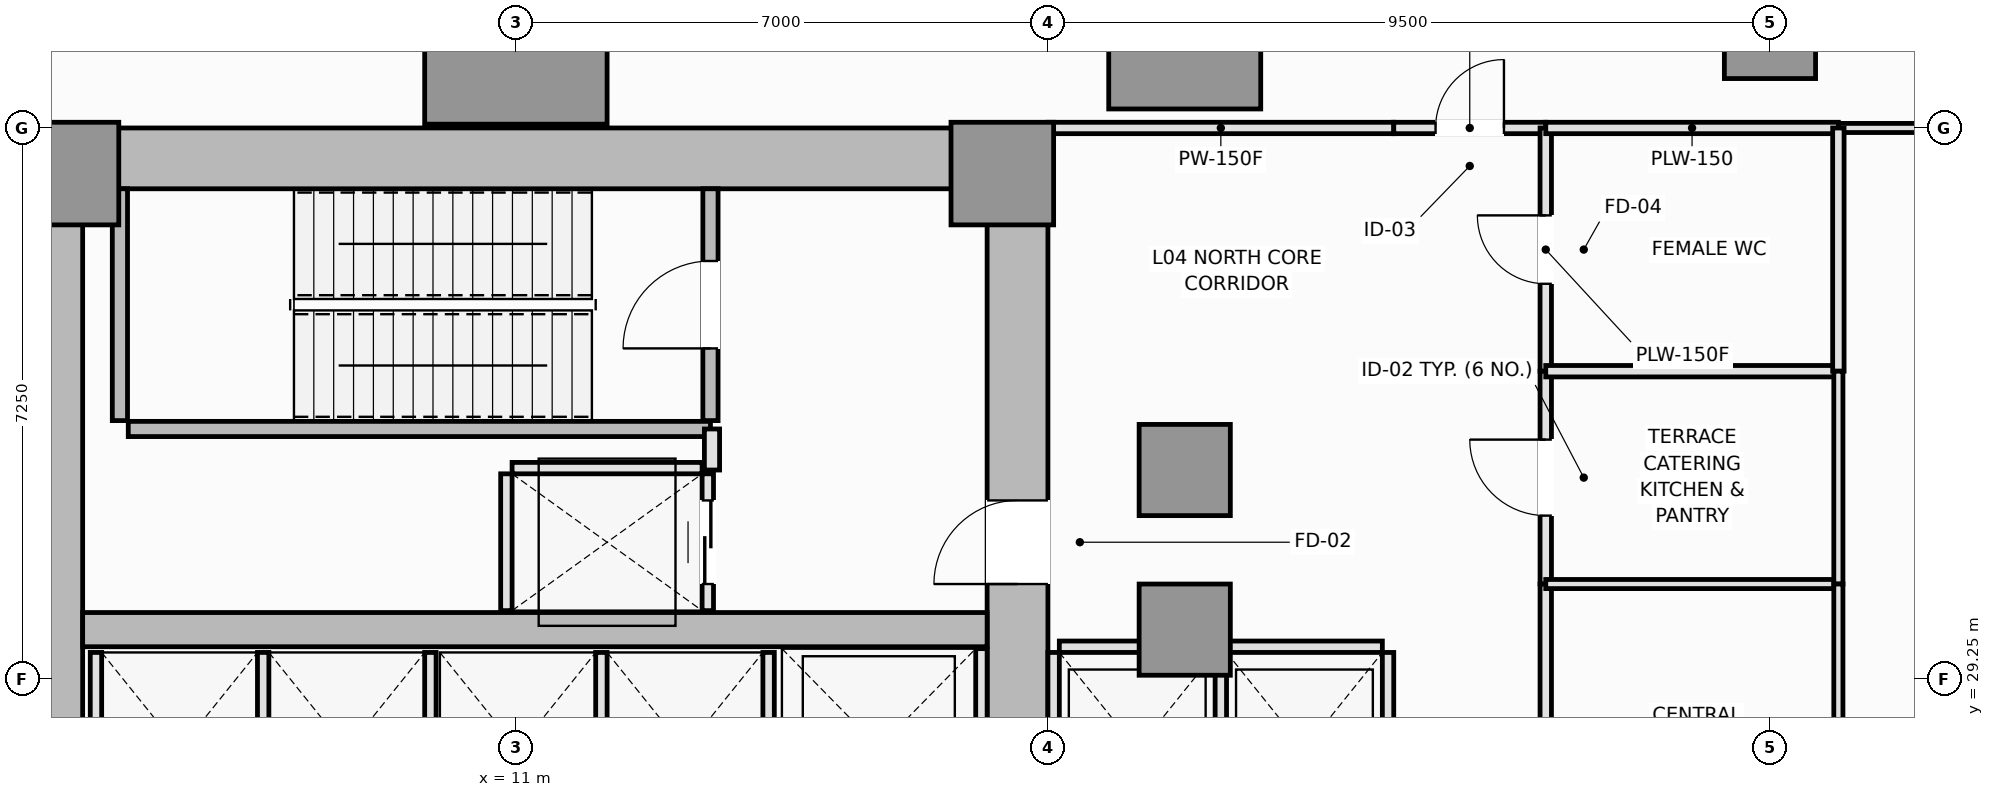
"""IFC4 building model, lengths in metres.
Left out: names, types, materials, properties, quantities, classifications, styles, units other than length and angle.
Written with IfcOpenShell. Run it as: python <this file> out.ifc"""

import sys

from ifc_helpers import new_model, si_unit, direction, frame, frame_2d, origin, origin_2d, place, context, subcontext, project, spatial, rectangle, extrude, element, fill, save


model = new_model("IFC4")
c1 = context("Model", 3, precision=1e-05, world=origin(), true_north=direction((0.0, 1.0)))
c2 = subcontext(c1, "Body", "Model", "MODEL_VIEW")
j1 = project(units=[si_unit("LENGTHUNIT", "METRE"), si_unit("PLANEANGLEUNIT", "RADIAN")], contexts=[c1])
p1 = place(None, origin())
s1 = spatial("IfcSite", under=j1, at=p1, CompositionType="ELEMENT")
p2 = place(p1, origin())
s2 = spatial("IfcBuilding", under=s1, at=p2, CompositionType="ELEMENT")
p3 = place(p2, frame((0.0, 0.0, 20.4)))
s3 = spatial("IfcBuildingStorey", under=s2, at=p3, CompositionType="ELEMENT", Elevation=20.4)
p4 = place(p3, frame((4.5, 36.1, 0.0), z_axis=(0.0, 0.0, 1.0), x_axis=(1.0, 0.0, 0.0)))
e1 = element("IfcWall", 1, at=p4, inside=s3, PredefinedType="SHEAR", context=c2, shape_type="SweptSolid", body=[
    extrude(rectangle(XDim=13.5, YDim=0.8, at=frame_2d((6.75, 0.0))), origin(), (0.0, 0.0, 1.0), 5.2),
])
p5 = place(p3, frame((4.9, 14.8, 0.0), z_axis=(0.0, 0.0, 1.0), x_axis=(0.0, 1.0, 0.0)))
e2 = element("IfcWall", 2, at=p5, inside=s3, PredefinedType="SHEAR", context=c2, shape_type="SweptSolid", body=[
    extrude(rectangle(XDim=20.9, YDim=0.8, at=frame_2d((10.45, 0.0))), origin(), (0.0, 0.0, 1.0), 5.2),
])
p6 = place(p3, frame((17.6, 27.05, 0.0), z_axis=(0.0, 0.0, 1.0), x_axis=(0.0, 1.0, 0.0)))
e3 = element("IfcWall", 3, at=p6, inside=s3, PredefinedType="SHEAR", context=c2, shape_type="SweptSolid", body=[
    extrude(rectangle(XDim=8.65, YDim=0.8, at=frame_2d((4.325, 0.0))), origin(), (0.0, 0.0, 1.0), 5.2),
])
p7 = place(p6, frame((3.45, 0.0, 0.0)))
e4 = element("IfcOpeningElement", 4, at=p7, cuts=e3, PredefinedType="OPENING", context=c2, shape_type="SweptSolid", body=[
    extrude(rectangle(XDim=1.1, YDim=2.15, at=frame_2d((0.55, 1.075))), frame((0.0, 0.41, 0.0), z_axis=(0.0, -1.0, 0.0), x_axis=(1.0, 0.0, 0.0)), (0.0, 0.0, 1.0), 0.82),
])
p8 = place(p3, frame((5.3, 29.9, 0.0), z_axis=(0.0, 0.0, 1.0), x_axis=(1.0, 0.0, 0.0)))
e5 = element("IfcWall", 5, at=p8, inside=s3, PredefinedType="SHEAR", context=c2, shape_type="SweptSolid", body=[
    extrude(rectangle(XDim=11.9, YDim=0.45, at=frame_2d((5.95, 0.0))), origin(), (0.0, 0.0, 1.0), 5.2),
])
for number, where, z_axis, x_axis in (
    (6, (5.1, 35.9, 0.0), (0.0, 0.0, 1.0), (1.0, 0.0, 0.0)),
    (7, (17.4, 35.9, 0.0), (0.0, 0.0, 1.0), (1.0, 0.0, 0.0)),
):
    element("IfcColumn", number, at=place(p3, frame(where, z_axis=z_axis, x_axis=x_axis)), inside=s3, PredefinedType="PILASTER", context=c2, shape_type="SweptSolid", body=[
        extrude(rectangle(XDim=1.35, YDim=1.35, at=origin_2d()), origin(), (0.0, 0.0, 1.0), 5.2),
    ])
p9 = place(p3, frame((11.0, 37.75, 0.0), z_axis=(0.0, 0.0, 1.0), x_axis=(1.0, 0.0, 0.0)))
e8 = element("IfcColumn", 8, at=p9, inside=s3, PredefinedType="COLUMN", context=c2, shape_type="SweptSolid", body=[
    extrude(rectangle(XDim=2.4, YDim=2.4, at=origin_2d()), origin(), (0.0, 0.0, 1.0), 5.2),
])
p10 = place(p3, frame((27.5, 37.75, 0.0), z_axis=(0.0, 0.0, 1.0), x_axis=(1.0, 0.0, 0.0)))
e9 = element("IfcColumn", 9, at=p10, inside=s3, PredefinedType="COLUMN", context=c2, shape_type="SweptSolid", body=[
    extrude(rectangle(XDim=1.2, YDim=1.2, at=origin_2d()), origin(), (0.0, 0.0, 1.0), 5.2),
])
p11 = place(p3, frame((19.8, 37.75, 0.0), z_axis=(0.0, 0.0, 1.0), x_axis=(1.0, 0.0, 0.0)))
e10 = element("IfcColumn", 10, at=p11, inside=s3, PredefinedType="COLUMN", context=c2, shape_type="SweptSolid", body=[
    extrude(rectangle(XDim=2.0, YDim=2.0, at=origin_2d()), origin(), (0.0, 0.0, 1.0), 5.2),
])
for number, where, z_axis, x_axis in (
    (11, (19.8, 29.9, 0.0), (0.0, 0.0, 1.0), (1.0, 0.0, 0.0)),
    (12, (19.8, 32.0, 0.0), (0.0, 0.0, 1.0), (1.0, 0.0, 0.0)),
):
    element("IfcColumn", number, at=place(p3, frame(where, z_axis=z_axis, x_axis=x_axis)), inside=s3, PredefinedType="COLUMN", context=c2, shape_type="SweptSolid", body=[
        extrude(rectangle(XDim=1.2, YDim=1.2, at=origin_2d()), origin(), (0.0, 0.0, 1.0), 5.2),
    ])
p12 = place(p3, frame((5.79, 32.65, 0.0), z_axis=(0.0, 0.0, 1.0), x_axis=(0.0, 1.0, 0.0)))
e13 = element("IfcWall", 13, at=p12, inside=s3, PredefinedType="SOLIDWALL", context=c2, shape_type="SweptSolid", body=[
    extrude(rectangle(XDim=3.05, YDim=0.2, at=frame_2d((1.525, 0.0))), origin(), (0.0, 0.0, 1.0), 5.2),
])
p13 = place(p3, frame((5.9, 32.54, 0.0), z_axis=(0.0, 0.0, 1.0), x_axis=(1.0, 0.0, 0.0)))
e14 = element("IfcWall", 14, at=p13, inside=s3, PredefinedType="SOLIDWALL", context=c2, shape_type="SweptSolid", body=[
    extrude(rectangle(XDim=7.66, YDim=0.2, at=frame_2d((3.83, 0.0))), origin(), (0.0, 0.0, 1.0), 5.2),
])
p14 = place(p3, frame((13.56, 32.65, 0.0), z_axis=(0.0, 0.0, 1.0), x_axis=(0.0, 1.0, 0.0)))
e15 = element("IfcWall", 15, at=p14, inside=s3, PredefinedType="SOLIDWALL", context=c2, shape_type="SweptSolid", body=[
    extrude(rectangle(XDim=3.05, YDim=0.2, at=frame_2d((1.525, 0.0))), origin(), (0.0, 0.0, 1.0), 5.2),
])
p15 = place(p14, frame((0.95, 0.0, 0.0)))
e16 = element("IfcOpeningElement", 16, at=p15, cuts=e15, PredefinedType="OPENING", context=c2, shape_type="SweptSolid", body=[
    extrude(rectangle(XDim=1.15, YDim=2.15, at=frame_2d((0.575, 1.075))), frame((0.0, 0.11, 0.0), z_axis=(0.0, -1.0, 0.0), x_axis=(1.0, 0.0, 0.0)), (0.0, 0.0, 1.0), 0.22),
])
p16 = place(p3, frame((18.15, 29.675, 0.0), z_axis=(0.0, 0.0, 1.0), x_axis=(1.0, 0.0, 0.0)))
e17 = element("IfcWall", 17, at=p16, inside=s3, PredefinedType="PARTITIONING", context=c2, shape_type="SweptSolid", body=[
    extrude(rectangle(XDim=2.05, YDim=0.15, at=frame_2d((1.025, 0.0))), origin(), (0.0, 0.0, 1.0), 5.02),
])
for number, where, z_axis, x_axis in (
    (18, (18.075, 27.05, 0.0), (0.0, 0.0, 1.0), (0.0, 1.0, 0.0)),
    (19, (20.275, 27.05, 0.0), (0.0, 0.0, 1.0), (0.0, 1.0, 0.0)),
):
    element("IfcWall", number, at=place(p3, frame(where, z_axis=z_axis, x_axis=x_axis)), inside=s3, PredefinedType="PARTITIONING", context=c2, shape_type="SweptSolid", body=[
        extrude(rectangle(XDim=2.55, YDim=0.15, at=frame_2d((1.275, 0.0))), origin(), (0.0, 0.0, 1.0), 5.02),
    ])
p17 = place(p3, frame((20.35, 29.675, 0.0), z_axis=(0.0, 0.0, 1.0), x_axis=(1.0, 0.0, 0.0)))
e20 = element("IfcWall", 20, at=p17, inside=s3, PredefinedType="PARTITIONING", context=c2, shape_type="SweptSolid", body=[
    extrude(rectangle(XDim=2.05, YDim=0.15, at=frame_2d((1.025, 0.0))), origin(), (0.0, 0.0, 1.0), 5.02),
])
p18 = place(p3, frame((22.475, 27.05, 0.0), z_axis=(0.0, 0.0, 1.0), x_axis=(0.0, 1.0, 0.0)))
e21 = element("IfcWall", 21, at=p18, inside=s3, PredefinedType="PARTITIONING", context=c2, shape_type="SweptSolid", body=[
    extrude(rectangle(XDim=2.55, YDim=0.15, at=frame_2d((1.275, 0.0))), origin(), (0.0, 0.0, 1.0), 4.57),
])
for number, where, z_axis, x_axis in (
    (22, (5.475, 27.05, 0.0), (0.0, 0.0, 1.0), (0.0, 1.0, 0.0)),
    (23, (7.675, 27.05, 0.0), (0.0, 0.0, 1.0), (0.0, 1.0, 0.0)),
    (24, (9.875, 27.05, 0.0), (0.0, 0.0, 1.0), (0.0, 1.0, 0.0)),
    (25, (12.125, 27.05, 0.0), (0.0, 0.0, 1.0), (0.0, 1.0, 0.0)),
    (26, (14.325, 27.05, 0.0), (0.0, 0.0, 1.0), (0.0, 1.0, 0.0)),
):
    element("IfcWall", number, at=place(p3, frame(where, z_axis=z_axis, x_axis=x_axis)), inside=s3, PredefinedType="PARTITIONING", context=c2, shape_type="SweptSolid", body=[
        extrude(rectangle(XDim=2.55, YDim=0.15, at=frame_2d((1.275, 0.0))), origin(), (0.0, 0.0, 1.0), 5.02),
    ])
p19 = place(p3, frame((17.125, 27.05, 0.0), z_axis=(0.0, 0.0, 1.0), x_axis=(0.0, 1.0, 0.0)))
e27 = element("IfcWall", 27, at=p19, inside=s3, PredefinedType="PARTITIONING", context=c2, shape_type="SweptSolid", body=[
    extrude(rectangle(XDim=2.6, YDim=0.15, at=frame_2d((1.3, 0.0))), origin(), (0.0, 0.0, 1.0), 5.02),
])
p20 = place(p3, frame((10.95, 32.025, 0.0), z_axis=(0.0, 0.0, 1.0), x_axis=(1.0, 0.0, 0.0)))
e28 = element("IfcWall", 28, at=p20, inside=s3, PredefinedType="PARTITIONING", context=c2, shape_type="SweptSolid", body=[
    extrude(rectangle(XDim=2.5, YDim=0.15, at=frame_2d((1.25, 0.0))), origin(), (0.0, 0.0, 1.0), 5.02),
])
p21 = place(p3, frame((10.875, 30.15, 0.0), z_axis=(0.0, 0.0, 1.0), x_axis=(0.0, 1.0, 0.0)))
e29 = element("IfcWall", 29, at=p21, inside=s3, PredefinedType="PARTITIONING", context=c2, shape_type="SweptSolid", body=[
    extrude(rectangle(XDim=1.8, YDim=0.15, at=frame_2d((0.9, 0.0))), origin(), (0.0, 0.0, 1.0), 5.02),
])
p22 = place(p3, frame((13.525, 30.15, 0.0), z_axis=(0.0, 0.0, 1.0), x_axis=(0.0, 1.0, 0.0)))
e30 = element("IfcWall", 30, at=p22, inside=s3, PredefinedType="PARTITIONING", context=c2, shape_type="SweptSolid", body=[
    extrude(rectangle(XDim=1.8, YDim=0.15, at=frame_2d((0.9, 0.0))), origin(), (0.0, 0.0, 1.0), 5.02),
])
p23 = place(p22, frame((0.35, 0.0, 0.0)))
e31 = element("IfcOpeningElement", 31, at=p23, cuts=e30, PredefinedType="OPENING", context=c2, shape_type="SweptSolid", body=[
    extrude(rectangle(XDim=1.1, YDim=2.2, at=frame_2d((0.55, 1.1))), frame((0.0, 0.085, 0.0), z_axis=(0.0, -1.0, 0.0), x_axis=(1.0, 0.0, 0.0)), (0.0, 0.0, 1.0), 0.17),
])
p24 = place(p3, frame((13.58, 32.0, 0.0), z_axis=(0.0, 0.0, 1.0), x_axis=(0.0, 1.0, 0.0)))
e32 = element("IfcWall", 32, at=p24, inside=s3, PredefinedType="PARTITIONING", context=c2, shape_type="SweptSolid", body=[
    extrude(rectangle(XDim=0.54, YDim=0.2, at=frame_2d((0.27, 0.0))), origin(), (0.0, 0.0, 1.0), 5.02),
])
p25 = place(p3, frame((18.0, 36.5, 0.0), z_axis=(0.0, 0.0, 1.0), x_axis=(1.0, 0.0, 0.0)))
e33 = element("IfcWall", 33, at=p25, inside=s3, PredefinedType="PARTITIONING", context=c2, shape_type="SweptSolid", body=[
    extrude(rectangle(XDim=4.55, YDim=0.15, at=frame_2d((2.275, 0.0))), origin(), (0.0, 0.0, 1.0), 5.02),
])
p26 = place(p3, frame((22.55, 36.5, 0.0), z_axis=(0.0, 0.0, 1.0), x_axis=(1.0, 0.0, 0.0)))
e34 = element("IfcWall", 34, at=p26, inside=s3, PredefinedType="PARTITIONING", context=c2, shape_type="SweptSolid", body=[
    extrude(rectangle(XDim=2.0, YDim=0.15, at=frame_2d((1.0, 0.0))), origin(), (0.0, 0.0, 1.0), 5.02),
])
p27 = place(p26, frame((0.55, 0.0, 0.0)))
e35 = element("IfcOpeningElement", 35, at=p27, cuts=e34, PredefinedType="OPENING", context=c2, shape_type="SweptSolid", body=[
    extrude(rectangle(XDim=0.9, YDim=2.1, at=frame_2d((0.45, 1.05))), frame((0.0, 0.085, 0.0), z_axis=(0.0, -1.0, 0.0), x_axis=(1.0, 0.0, 0.0)), (0.0, 0.0, 1.0), 0.17),
])
p28 = place(p3, frame((24.55, 33.3, 0.0), z_axis=(0.0, 0.0, 1.0), x_axis=(0.0, 1.0, 0.0)))
e36 = element("IfcWall", 36, at=p28, inside=s3, PredefinedType="PLUMBINGWALL", context=c2, shape_type="SweptSolid", body=[
    extrude(rectangle(XDim=3.2, YDim=0.15, at=frame_2d((1.6, 0.0))), origin(), (0.0, 0.0, 1.0), 5.02),
])
p29 = place(p28, frame((1.15, 0.0, 0.0)))
e37 = element("IfcOpeningElement", 37, at=p29, cuts=e36, PredefinedType="OPENING", context=c2, shape_type="SweptSolid", body=[
    extrude(rectangle(XDim=0.9, YDim=2.1, at=frame_2d((0.45, 1.05))), frame((0.0, 0.085, 0.0), z_axis=(0.0, -1.0, 0.0), x_axis=(1.0, 0.0, 0.0)), (0.0, 0.0, 1.0), 0.17),
])
p30 = place(p3, frame((24.55, 30.5, 0.0), z_axis=(0.0, 0.0, 1.0), x_axis=(0.0, 1.0, 0.0)))
e38 = element("IfcWall", 38, at=p30, inside=s3, PredefinedType="PARTITIONING", context=c2, shape_type="SweptSolid", body=[
    extrude(rectangle(XDim=2.8, YDim=0.15, at=frame_2d((1.4, 0.0))), origin(), (0.0, 0.0, 1.0), 5.02),
])
p31 = place(p30, frame((0.9, 0.0, 0.0)))
e39 = element("IfcOpeningElement", 39, at=p31, cuts=e38, PredefinedType="OPENING", context=c2, shape_type="SweptSolid", body=[
    extrude(rectangle(XDim=1.0, YDim=2.15, at=frame_2d((0.5, 1.075))), frame((0.0, 0.085, 0.0), z_axis=(0.0, -1.0, 0.0), x_axis=(1.0, 0.0, 0.0)), (0.0, 0.0, 1.0), 0.17),
])
p32 = place(p3, frame((24.55, 22.9, 0.0), z_axis=(0.0, 0.0, 1.0), x_axis=(0.0, 1.0, 0.0)))
e40 = element("IfcWall", 40, at=p32, inside=s3, PredefinedType="PARTITIONING", context=c2, shape_type="SweptSolid", body=[
    extrude(rectangle(XDim=7.6, YDim=0.15, at=frame_2d((3.8, 0.0))), origin(), (0.0, 0.0, 1.0), 5.02),
])
p33 = place(p32, frame((3.3, 0.0, 0.0)))
e41 = element("IfcOpeningElement", 41, at=p33, cuts=e40, PredefinedType="OPENING", context=c2, shape_type="SweptSolid", body=[
    extrude(rectangle(XDim=1.0, YDim=2.15, at=frame_2d((0.5, 1.075))), frame((0.0, 0.085, 0.0), z_axis=(0.0, -1.0, 0.0), x_axis=(1.0, 0.0, 0.0)), (0.0, 0.0, 1.0), 0.17),
])
p34 = place(p3, frame((24.55, 36.5, 0.0), z_axis=(0.0, 0.0, 1.0), x_axis=(1.0, 0.0, 0.0)))
e42 = element("IfcWall", 42, at=p34, inside=s3, PredefinedType="PLUMBINGWALL", context=c2, shape_type="SweptSolid", body=[
    extrude(rectangle(XDim=3.85, YDim=0.15, at=frame_2d((1.925, 0.0))), origin(), (0.0, 0.0, 1.0), 5.02),
])
p35 = place(p3, frame((28.4, 36.5, 0.0), z_axis=(0.0, 0.0, 1.0), x_axis=(1.0, 0.0, 0.0)))
e43 = element("IfcWall", 43, at=p35, inside=s3, PredefinedType="PARTITIONING", context=c2, shape_type="SweptSolid", body=[
    extrude(rectangle(XDim=9.8, YDim=0.12, at=frame_2d((4.9, 0.0))), origin(), (0.0, 0.0, 1.0), 5.02),
])
p36 = place(p3, frame((24.55, 33.3, 0.0), z_axis=(0.0, 0.0, 1.0), x_axis=(1.0, 0.0, 0.0)))
e44 = element("IfcWall", 44, at=p36, inside=s3, PredefinedType="PLUMBINGWALL", context=c2, shape_type="SweptSolid", body=[
    extrude(rectangle(XDim=3.85, YDim=0.15, at=frame_2d((1.925, 0.0))), origin(), (0.0, 0.0, 1.0), 5.02),
])
p37 = place(p3, frame((28.4, 33.3, 0.0), z_axis=(0.0, 0.0, 1.0), x_axis=(0.0, 1.0, 0.0)))
e45 = element("IfcWall", 45, at=p37, inside=s3, PredefinedType="PLUMBINGWALL", context=c2, shape_type="SweptSolid", body=[
    extrude(rectangle(XDim=3.2, YDim=0.15, at=frame_2d((1.6, 0.0))), origin(), (0.0, 0.0, 1.0), 5.02),
])
p38 = place(p3, frame((24.55, 30.5, 0.0), z_axis=(0.0, 0.0, 1.0), x_axis=(1.0, 0.0, 0.0)))
e46 = element("IfcWall", 46, at=p38, inside=s3, PredefinedType="PARTITIONING", context=c2, shape_type="SweptSolid", body=[
    extrude(rectangle(XDim=3.85, YDim=0.12, at=frame_2d((1.925, 0.0))), origin(), (0.0, 0.0, 1.0), 5.02),
])
p39 = place(p3, frame((28.4, 30.5, 0.0), z_axis=(0.0, 0.0, 1.0), x_axis=(0.0, 1.0, 0.0)))
e47 = element("IfcWall", 47, at=p39, inside=s3, PredefinedType="PARTITIONING", context=c2, shape_type="SweptSolid", body=[
    extrude(rectangle(XDim=2.8, YDim=0.12, at=frame_2d((1.4, 0.0))), origin(), (0.0, 0.0, 1.0), 5.02),
])
p40 = place(p3, frame((28.4, 22.9, 0.0), z_axis=(0.0, 0.0, 1.0), x_axis=(0.0, 1.0, 0.0)))
e48 = element("IfcWall", 48, at=p40, inside=s3, PredefinedType="PARTITIONING", context=c2, shape_type="SweptSolid", body=[
    extrude(rectangle(XDim=7.6, YDim=0.12, at=frame_2d((3.8, 0.0))), origin(), (0.0, 0.0, 1.0), 5.02),
])
p41 = place(p15, origin())
e49 = element("IfcDoor", 49, at=p41, inside=s3, OperationType="SINGLE_SWING_LEFT", PredefinedType="DOOR", context=c2, shape_type="SweptSolid", body=[
    extrude(rectangle(XDim=1.15, YDim=2.15, at=frame_2d((0.575, 1.075))), frame((0.0, 0.025, 0.0), z_axis=(0.0, -1.0, 0.0), x_axis=(1.0, 0.0, 0.0)), (0.0, 0.0, 1.0), 0.05),
])
fill(e16, e49)
p42 = place(p23, origin())
e50 = element("IfcDoor", 50, at=p42, inside=s3, OperationType="DOUBLE_DOOR_SLIDING", PredefinedType="DOOR", context=c2, shape_type="SweptSolid", body=[
    extrude(rectangle(XDim=1.1, YDim=2.2, at=frame_2d((0.55, 1.1))), frame((0.0, 0.025, 0.0), z_axis=(0.0, -1.0, 0.0), x_axis=(1.0, 0.0, 0.0)), (0.0, 0.0, 1.0), 0.05),
])
fill(e31, e50)
p43 = place(p7, origin())
e51 = element("IfcDoor", 51, at=p43, inside=s3, OperationType="SINGLE_SWING_LEFT", PredefinedType="DOOR", context=c2, shape_type="SweptSolid", body=[
    extrude(rectangle(XDim=1.1, YDim=2.15, at=frame_2d((0.55, 1.075))), frame((0.0, 0.025, 0.0), z_axis=(0.0, -1.0, 0.0), x_axis=(1.0, 0.0, 0.0)), (0.0, 0.0, 1.0), 0.05),
])
fill(e4, e51)
p44 = place(p27, origin())
e52 = element("IfcDoor", 52, at=p44, inside=s3, OperationType="SINGLE_SWING_RIGHT", PredefinedType="DOOR", context=c2, shape_type="SweptSolid", body=[
    extrude(rectangle(XDim=0.9, YDim=2.1, at=frame_2d((0.45, 1.05))), frame((0.0, 0.025, 0.0), z_axis=(0.0, -1.0, 0.0), x_axis=(1.0, 0.0, 0.0)), (0.0, 0.0, 1.0), 0.05),
])
fill(e35, e52)
p45 = place(p29, origin())
e53 = element("IfcDoor", 53, at=p45, inside=s3, OperationType="SINGLE_SWING_RIGHT", PredefinedType="DOOR", context=c2, shape_type="SweptSolid", body=[
    extrude(rectangle(XDim=0.9, YDim=2.1, at=frame_2d((0.45, 1.05))), frame((0.0, 0.025, 0.0), z_axis=(0.0, -1.0, 0.0), x_axis=(1.0, 0.0, 0.0)), (0.0, 0.0, 1.0), 0.05),
])
fill(e37, e53)
p46 = place(p31, origin())
e54 = element("IfcDoor", 54, at=p46, inside=s3, OperationType="SINGLE_SWING_RIGHT", PredefinedType="DOOR", context=c2, shape_type="SweptSolid", body=[
    extrude(rectangle(XDim=1.0, YDim=2.15, at=frame_2d((0.5, 1.075))), frame((0.0, 0.025, 0.0), z_axis=(0.0, -1.0, 0.0), x_axis=(1.0, 0.0, 0.0)), (0.0, 0.0, 1.0), 0.05),
])
fill(e39, e54)
save(model, sys.argv[1])
